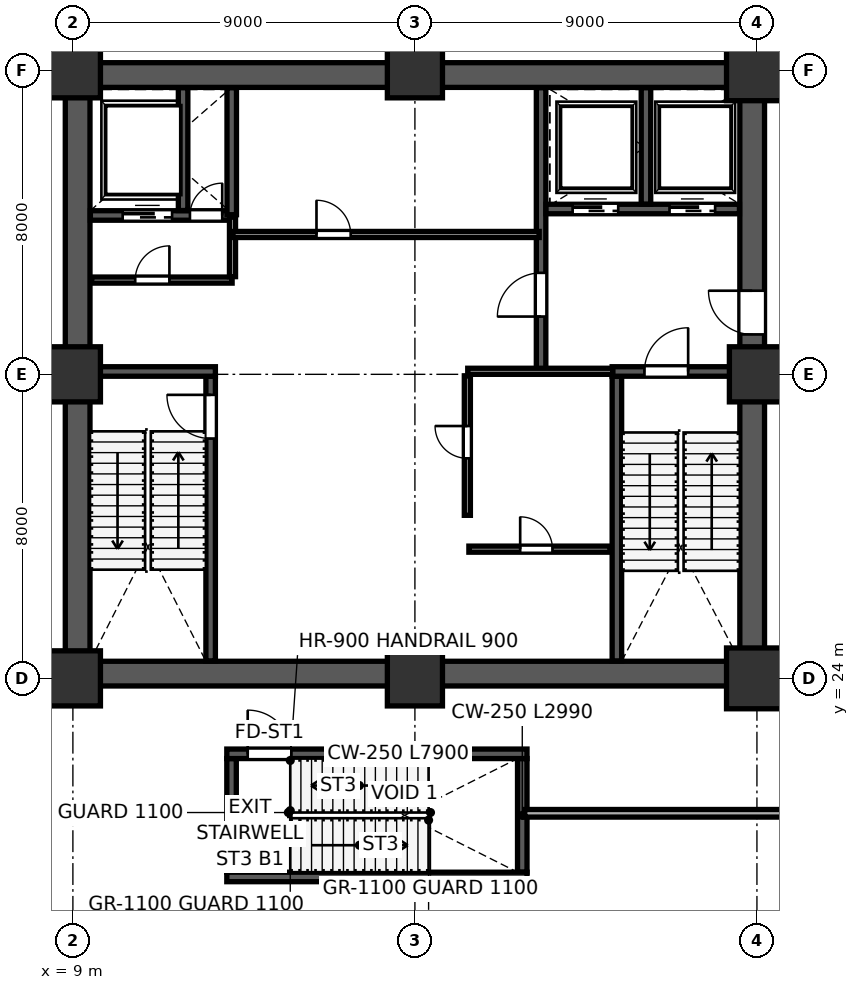
"""IFC4 building model, lengths in metres.
Left out: names, types, materials, properties, quantities, classifications, styles, units other than length and angle.
Written with IfcOpenShell. Run it as: python <this file> out.ifc"""

import sys

from ifc_helpers import new_model, si_unit, direction, frame, frame_2d, origin, origin_2d, place, context, subcontext, project, spatial, rectangle, extrude, source, transform, mapped, element, fill, save


model = new_model("IFC4")
c1 = context("Model", 3, precision=1e-05, world=origin(), true_north=direction((0.0, 1.0)))
c2 = subcontext(c1, "Body", "Model", "MODEL_VIEW")
j1 = project(units=[si_unit("LENGTHUNIT", "METRE"), si_unit("PLANEANGLEUNIT", "RADIAN")], contexts=[c1])
p1 = place(None, origin())
s1 = spatial("IfcSite", under=j1, at=p1, CompositionType="ELEMENT")
p2 = place(p1, origin())
s2 = spatial("IfcBuilding", under=s1, at=p2, CompositionType="ELEMENT")
p3 = place(p2, frame((0.0, 0.0, -4.8)))
s3 = spatial("IfcBuildingStorey", under=s2, at=p3, CompositionType="ELEMENT", Elevation=-4.8)
m1 = source(origin(), c2, "Body", "SweptSolid", [
    extrude(rectangle(XDim=1.45, YDim=1.45, at=origin_2d()), origin(), (0.0, 0.0, 1.0), 4.799),
])
for number, where, z_axis, x_axis in (
    (1, (9.0, 24.0, 0.001), (0.0, 0.0, 1.0), (1.0, 0.0, 0.0)),
    (2, (9.0, 32.0, 0.001), (0.0, 0.0, 1.0), (1.0, 0.0, 0.0)),
    (3, (9.0, 40.0, 0.001), (0.0, 0.0, 1.0), (1.0, 0.0, 0.0)),
    (4, (18.0, 24.0, 0.001), (0.0, 0.0, 1.0), (1.0, 0.0, 0.0)),
    (5, (18.0, 40.0, 0.001), (0.0, 0.0, 1.0), (1.0, 0.0, 0.0)),
):
    element("IfcColumn", number, at=place(p3, frame(where, z_axis=z_axis, x_axis=x_axis)), inside=s3, PredefinedType="COLUMN", context=c2, shape_type="MappedRepresentation", body=[
        mapped(m1, transform((0.0, 0.0, 0.0), scale=1.0)),
    ])
m2 = source(origin(), c2, "Body", "SweptSolid", [
    extrude(rectangle(XDim=1.6, YDim=1.6, at=origin_2d()), origin(), (0.0, 0.0, 1.0), 4.799),
])
p4 = place(p3, frame((27.0, 24.0, 0.001), z_axis=(0.0, 0.0, 1.0), x_axis=(1.0, 0.0, 0.0)))
e6 = element("IfcColumn", 6, at=p4, inside=s3, PredefinedType="COLUMN", context=c2, shape_type="MappedRepresentation", body=[
    mapped(m2, transform((0.0, 0.0, 0.0), scale=1.0)),
])
p5 = place(p3, frame((27.0, 32.0, 0.001), z_axis=(0.0, 0.0, 1.0), x_axis=(1.0, 0.0, 0.0)))
e7 = element("IfcColumn", 7, at=p5, inside=s3, PredefinedType="COLUMN", context=c2, shape_type="MappedRepresentation", body=[
    mapped(m1, transform((0.0, 0.0, 0.0), scale=1.0)),
])
p6 = place(p3, frame((27.0, 40.0, 0.001), z_axis=(0.0, 0.0, 1.0), x_axis=(1.0, 0.0, 0.0)))
e8 = element("IfcColumn", 8, at=p6, inside=s3, PredefinedType="COLUMN", context=c2, shape_type="MappedRepresentation", body=[
    mapped(m2, transform((0.0, 0.0, 0.0), scale=1.0)),
])
p7 = place(p3, frame((9.125, 24.45, 0.0), z_axis=(0.0, 0.0, 1.0), x_axis=(0.0, 1.0, 0.0)))
e9 = element("IfcWall", 9, at=p7, inside=s3, PredefinedType="SHEAR", context=c2, shape_type="SweptSolid", body=[
    extrude(rectangle(XDim=15.1, YDim=0.65, at=frame_2d((7.55, 0.0))), origin(), (0.0, 0.0, 1.0), 4.52),
])
p8 = place(p3, frame((26.875, 24.45, 0.0), z_axis=(0.0, 0.0, 1.0), x_axis=(0.0, 1.0, 0.0)))
e10 = element("IfcWall", 10, at=p8, inside=s3, PredefinedType="SHEAR", context=c2, shape_type="SweptSolid", body=[
    extrude(rectangle(XDim=15.1, YDim=0.65, at=frame_2d((7.55, 0.0))), origin(), (0.0, 0.0, 1.0), 4.52),
])
p9 = place(p8, frame((8.6, 0.0, 0.0)))
e11 = element("IfcOpeningElement", 11, at=p9, cuts=e10, PredefinedType="OPENING", context=c2, shape_type="SweptSolid", body=[
    extrude(rectangle(XDim=1.15, YDim=2.2, at=frame_2d((0.575, 1.1))), frame((0.0, 0.335, 0.0), z_axis=(0.0, -1.0, 0.0), x_axis=(1.0, 0.0, 0.0)), (0.0, 0.0, 1.0), 0.67),
])
for number, where, z_axis, x_axis in (
    (12, (8.8, 24.125, 0.0), (0.0, 0.0, 1.0), (1.0, 0.0, 0.0)),
    (13, (8.8, 39.875, 0.0), (0.0, 0.0, 1.0), (1.0, 0.0, 0.0)),
):
    element("IfcWall", number, at=place(p3, frame(where, z_axis=z_axis, x_axis=x_axis)), inside=s3, PredefinedType="SHEAR", context=c2, shape_type="SweptSolid", body=[
        extrude(rectangle(XDim=18.4, YDim=0.65, at=frame_2d((9.2, 0.0))), origin(), (0.0, 0.0, 1.0), 4.52),
    ])
p10 = place(p3, frame((12.625, 24.46, 0.0), z_axis=(0.0, 0.0, 1.0), x_axis=(0.0, 1.0, 0.0)))
e14 = element("IfcWall", 14, at=p10, inside=s3, PredefinedType="SHEAR", context=c2, shape_type="SweptSolid", body=[
    extrude(rectangle(XDim=7.49, YDim=0.25, at=frame_2d((3.745, 0.0))), origin(), (0.0, 0.0, 1.0), 4.52),
])
p11 = place(p10, frame((5.85, 0.0, 0.0)))
e15 = element("IfcOpeningElement", 15, at=p11, cuts=e14, PredefinedType="OPENING", context=c2, shape_type="SweptSolid", body=[
    extrude(rectangle(XDim=1.15, YDim=2.2, at=frame_2d((0.575, 1.1))), frame((0.0, 0.135, 0.0), z_axis=(0.0, -1.0, 0.0), x_axis=(1.0, 0.0, 0.0)), (0.0, 0.0, 1.0), 0.27),
])
p12 = place(p3, frame((9.46, 32.075, 0.0), z_axis=(0.0, 0.0, 1.0), x_axis=(1.0, 0.0, 0.0)))
e16 = element("IfcWall", 16, at=p12, inside=s3, PredefinedType="SHEAR", context=c2, shape_type="SweptSolid", body=[
    extrude(rectangle(XDim=3.29, YDim=0.25, at=frame_2d((1.645, 0.0))), origin(), (0.0, 0.0, 1.0), 4.52),
])
p13 = place(p3, frame((23.315, 24.46, 0.0), z_axis=(0.0, 0.0, 1.0), x_axis=(0.0, 1.0, 0.0)))
e17 = element("IfcWall", 17, at=p13, inside=s3, PredefinedType="SHEAR", context=c2, shape_type="SweptSolid", body=[
    extrude(rectangle(XDim=7.49, YDim=0.25, at=frame_2d((3.745, 0.0))), origin(), (0.0, 0.0, 1.0), 4.52),
])
p14 = place(p3, frame((23.19, 32.075, 0.0), z_axis=(0.0, 0.0, 1.0), x_axis=(1.0, 0.0, 0.0)))
e18 = element("IfcWall", 18, at=p14, inside=s3, PredefinedType="SHEAR", context=c2, shape_type="SweptSolid", body=[
    extrude(rectangle(XDim=3.35, YDim=0.25, at=frame_2d((1.675, 0.0))), origin(), (0.0, 0.0, 1.0), 4.52),
])
p15 = place(p14, frame((0.85, 0.0, 0.0)))
e19 = element("IfcOpeningElement", 19, at=p15, cuts=e18, PredefinedType="OPENING", context=c2, shape_type="SweptSolid", body=[
    extrude(rectangle(XDim=1.15, YDim=2.2, at=frame_2d((0.575, 1.1))), frame((0.0, 0.135, 0.0), z_axis=(0.0, -1.0, 0.0), x_axis=(1.0, 0.0, 0.0)), (0.0, 0.0, 1.0), 0.27),
])
p16 = place(p3, frame((21.32, 32.12, 0.0), z_axis=(0.0, 0.0, 1.0), x_axis=(0.0, 1.0, 0.0)))
e20 = element("IfcWall", 20, at=p16, inside=s3, PredefinedType="SHEAR", context=c2, shape_type="SweptSolid", body=[
    extrude(rectangle(XDim=7.42, YDim=0.25, at=frame_2d((3.71, 0.0))), origin(), (0.0, 0.0, 1.0), 4.52),
])
p17 = place(p16, frame((1.4, 0.0, 0.0)))
e21 = element("IfcOpeningElement", 21, at=p17, cuts=e20, PredefinedType="OPENING", context=c2, shape_type="SweptSolid", body=[
    extrude(rectangle(XDim=1.15, YDim=2.2, at=frame_2d((0.575, 1.1))), frame((0.0, 0.135, 0.0), z_axis=(0.0, -1.0, 0.0), x_axis=(1.0, 0.0, 0.0)), (0.0, 0.0, 1.0), 0.27),
])
p18 = place(p3, frame((9.46, 36.18, 0.0), z_axis=(0.0, 0.0, 1.0), x_axis=(1.0, 0.0, 0.0)))
e22 = element("IfcWall", 22, at=p18, inside=s3, PredefinedType="SHEAR", context=c2, shape_type="SweptSolid", body=[
    extrude(rectangle(XDim=3.79, YDim=0.25, at=frame_2d((1.895, 0.0))), origin(), (0.0, 0.0, 1.0), 4.52),
])
p19 = place(p18, frame((2.62, 0.0, 0.0)))
e23 = element("IfcOpeningElement", 23, at=p19, cuts=e22, PredefinedType="OPENING", context=c2, shape_type="SweptSolid", body=[
    extrude(rectangle(XDim=0.85, YDim=2.1, at=frame_2d((0.425, 1.05))), frame((0.0, 0.135, 0.0), z_axis=(0.0, -1.0, 0.0), x_axis=(1.0, 0.0, 0.0)), (0.0, 0.0, 1.0), 0.27),
])
p20 = place(p18, frame((0.85, 0.0, 0.0)))
e24 = element("IfcOpeningElement", 24, at=p20, cuts=e22, PredefinedType="OPENING", context=c2, shape_type="SweptSolid", body=[
    extrude(rectangle(XDim=1.3, YDim=2.25, at=frame_2d((0.65, 1.125))), frame((0.0, 0.135, 0.0), z_axis=(0.0, -1.0, 0.0), x_axis=(1.0, 0.0, 0.0)), (0.0, 0.0, 1.0), 0.27),
])
p21 = place(p3, frame((11.9, 36.31, 0.0), z_axis=(0.0, 0.0, 1.0), x_axis=(0.0, 1.0, 0.0)))
e25 = element("IfcWall", 25, at=p21, inside=s3, PredefinedType="SHEAR", context=c2, shape_type="SweptSolid", body=[
    extrude(rectangle(XDim=3.23, YDim=0.25, at=frame_2d((1.615, 0.0))), origin(), (0.0, 0.0, 1.0), 4.52),
])
p22 = place(p3, frame((21.45, 36.35, 0.0), z_axis=(0.0, 0.0, 1.0), x_axis=(1.0, 0.0, 0.0)))
e26 = element("IfcWall", 26, at=p22, inside=s3, PredefinedType="SHEAR", context=c2, shape_type="SweptSolid", body=[
    extrude(rectangle(XDim=5.09, YDim=0.25, at=frame_2d((2.545, 0.0))), origin(), (0.0, 0.0, 1.0), 4.52),
])
p23 = place(p22, frame((0.7, 0.0, 0.0)))
e27 = element("IfcOpeningElement", 27, at=p23, cuts=e26, PredefinedType="OPENING", context=c2, shape_type="SweptSolid", body=[
    extrude(rectangle(XDim=1.2, YDim=2.2, at=frame_2d((0.6, 1.1))), frame((0.0, 0.135, 0.0), z_axis=(0.0, -1.0, 0.0), x_axis=(1.0, 0.0, 0.0)), (0.0, 0.0, 1.0), 0.27),
])
p24 = place(p22, frame((3.25, 0.0, 0.0)))
e28 = element("IfcOpeningElement", 28, at=p24, cuts=e26, PredefinedType="OPENING", context=c2, shape_type="SweptSolid", body=[
    extrude(rectangle(XDim=1.2, YDim=2.2, at=frame_2d((0.6, 1.1))), frame((0.0, 0.135, 0.0), z_axis=(0.0, -1.0, 0.0), x_axis=(1.0, 0.0, 0.0)), (0.0, 0.0, 1.0), 0.27),
])
p25 = place(p3, frame((24.08, 36.48, 0.0), z_axis=(0.0, 0.0, 1.0), x_axis=(0.0, 1.0, 0.0)))
e29 = element("IfcWall", 29, at=p25, inside=s3, PredefinedType="SHEAR", context=c2, shape_type="SweptSolid", body=[
    extrude(rectangle(XDim=3.06, YDim=0.25, at=frame_2d((1.53, 0.0))), origin(), (0.0, 0.0, 1.0), 4.52),
])
p26 = place(p3, frame((13.18, 36.2, 0.0), z_axis=(0.0, 0.0, 1.0), x_axis=(0.0, 1.0, 0.0)))
e30 = element("IfcWall", 30, at=p26, inside=s3, PredefinedType="SHEAR", context=c2, shape_type="SweptSolid", body=[
    extrude(rectangle(XDim=3.34, YDim=0.25, at=frame_2d((1.67, 0.0))), origin(), (0.0, 0.0, 1.0), 4.52),
])
for number, where, z_axis, x_axis in (
    (31, (13.175, 18.9, 0.0), (0.0, 0.0, 1.0), (0.0, 1.0, 0.0)),
    (32, (20.825, 18.9, 0.0), (0.0, 0.0, 1.0), (0.0, 1.0, 0.0)),
):
    element("IfcWall", number, at=place(p3, frame(where, z_axis=z_axis, x_axis=x_axis)), inside=s3, PredefinedType="SHEAR", context=c2, shape_type="SweptSolid", body=[
        extrude(rectangle(XDim=2.99, YDim=0.25, at=frame_2d((1.495, 0.0))), origin(), (0.0, 0.0, 1.0), 4.52),
    ])
p27 = place(p3, frame((13.05, 18.775, 0.0), z_axis=(0.0, 0.0, 1.0), x_axis=(1.0, 0.0, 0.0)))
e33 = element("IfcWall", 33, at=p27, inside=s3, PredefinedType="SHEAR", context=c2, shape_type="SweptSolid", body=[
    extrude(rectangle(XDim=7.9, YDim=0.25, at=frame_2d((3.95, 0.0))), origin(), (0.0, 0.0, 1.0), 4.52),
])
p28 = place(p3, frame((13.05, 22.015, 0.0), z_axis=(0.0, 0.0, 1.0), x_axis=(1.0, 0.0, 0.0)))
e34 = element("IfcWall", 34, at=p28, inside=s3, PredefinedType="SHEAR", context=c2, shape_type="SweptSolid", body=[
    extrude(rectangle(XDim=7.9, YDim=0.25, at=frame_2d((3.95, 0.0))), origin(), (0.0, 0.0, 1.0), 4.52),
])
p29 = place(p28, frame((0.55, 0.0, 0.0)))
e35 = element("IfcOpeningElement", 35, at=p29, cuts=e34, PredefinedType="OPENING", context=c2, shape_type="SweptSolid", body=[
    extrude(rectangle(XDim=1.15, YDim=2.2, at=frame_2d((0.575, 1.1))), frame((0.0, 0.135, 0.0), z_axis=(0.0, -1.0, 0.0), x_axis=(1.0, 0.0, 0.0)), (0.0, 0.0, 1.0), 0.27),
])
p30 = place(p3, frame((9.49, 34.48, 0.0), z_axis=(0.0, 0.0, 1.0), x_axis=(1.0, 0.0, 0.0)))
e36 = element("IfcWall", 36, at=p30, inside=s3, PredefinedType="PARTITIONING", context=c2, shape_type="SweptSolid", body=[
    extrude(rectangle(XDim=3.7, YDim=0.16, at=frame_2d((1.85, 0.0))), origin(), (0.0, 0.0, 1.0), 4.52),
])
p31 = place(p30, frame((1.15, 0.0, 0.0)))
e37 = element("IfcOpeningElement", 37, at=p31, cuts=e36, PredefinedType="OPENING", context=c2, shape_type="SweptSolid", body=[
    extrude(rectangle(XDim=0.9, YDim=2.15, at=frame_2d((0.45, 1.075))), frame((0.0, 0.09, 0.0), z_axis=(0.0, -1.0, 0.0), x_axis=(1.0, 0.0, 0.0)), (0.0, 0.0, 1.0), 0.18),
])
p32 = place(p3, frame((13.2, 34.57, 0.0), z_axis=(0.0, 0.0, 1.0), x_axis=(0.0, 1.0, 0.0)))
e38 = element("IfcWall", 38, at=p32, inside=s3, PredefinedType="PARTITIONING", context=c2, shape_type="SweptSolid", body=[
    extrude(rectangle(XDim=1.57, YDim=0.16, at=frame_2d((0.785, 0.0))), origin(), (0.0, 0.0, 1.0), 4.52),
])
p33 = place(p3, frame((13.21, 35.68, 0.0), z_axis=(0.0, 0.0, 1.0), x_axis=(1.0, 0.0, 0.0)))
e39 = element("IfcWall", 39, at=p33, inside=s3, PredefinedType="PARTITIONING", context=c2, shape_type="SweptSolid", body=[
    extrude(rectangle(XDim=8.06, YDim=0.16, at=frame_2d((4.03, 0.0))), origin(), (0.0, 0.0, 1.0), 4.52),
])
p34 = place(p33, frame((2.2, 0.0, 0.0)))
e40 = element("IfcOpeningElement", 40, at=p34, cuts=e39, PredefinedType="OPENING", context=c2, shape_type="SweptSolid", body=[
    extrude(rectangle(XDim=0.9, YDim=2.15, at=frame_2d((0.45, 1.075))), frame((0.0, 0.09, 0.0), z_axis=(0.0, -1.0, 0.0), x_axis=(1.0, 0.0, 0.0)), (0.0, 0.0, 1.0), 0.18),
])
p35 = place(p3, frame((19.39, 32.08, 0.0), z_axis=(0.0, 0.0, 1.0), x_axis=(1.0, 0.0, 0.0)))
e41 = element("IfcWall", 41, at=p35, inside=s3, PredefinedType="PARTITIONING", context=c2, shape_type="SweptSolid", body=[
    extrude(rectangle(XDim=3.82, YDim=0.16, at=frame_2d((1.91, 0.0))), origin(), (0.0, 0.0, 1.0), 4.52),
])
p36 = place(p3, frame((19.38, 28.29, 0.0), z_axis=(0.0, 0.0, 1.0), x_axis=(0.0, 1.0, 0.0)))
e42 = element("IfcWall", 42, at=p36, inside=s3, PredefinedType="PARTITIONING", context=c2, shape_type="SweptSolid", body=[
    extrude(rectangle(XDim=3.67, YDim=0.16, at=frame_2d((1.835, 0.0))), origin(), (0.0, 0.0, 1.0), 4.52),
])
p37 = place(p36, frame((1.5, 0.0, 0.0)))
e43 = element("IfcOpeningElement", 43, at=p37, cuts=e42, PredefinedType="OPENING", context=c2, shape_type="SweptSolid", body=[
    extrude(rectangle(XDim=0.85, YDim=2.1, at=frame_2d((0.425, 1.05))), frame((0.0, 0.09, 0.0), z_axis=(0.0, -1.0, 0.0), x_axis=(1.0, 0.0, 0.0)), (0.0, 0.0, 1.0), 0.18),
])
p38 = place(p3, frame((19.42, 27.4, 0.0), z_axis=(0.0, 0.0, 1.0), x_axis=(1.0, 0.0, 0.0)))
e44 = element("IfcWall", 44, at=p38, inside=s3, PredefinedType="PARTITIONING", context=c2, shape_type="SweptSolid", body=[
    extrude(rectangle(XDim=3.72, YDim=0.16, at=frame_2d((1.86, 0.0))), origin(), (0.0, 0.0, 1.0), 4.52),
])
p39 = place(p38, frame((1.35, 0.0, 0.0)))
e45 = element("IfcOpeningElement", 45, at=p39, cuts=e44, PredefinedType="OPENING", context=c2, shape_type="SweptSolid", body=[
    extrude(rectangle(XDim=0.85, YDim=2.1, at=frame_2d((0.425, 1.05))), frame((0.0, 0.09, 0.0), z_axis=(0.0, -1.0, 0.0), x_axis=(1.0, 0.0, 0.0)), (0.0, 0.0, 1.0), 0.18),
])
p40 = place(p3, frame((20.89, 20.45, 0.0), z_axis=(0.0, 0.0, 1.0), x_axis=(1.0, 0.0, 0.0)))
e46 = element("IfcWall", 46, at=p40, inside=s3, PredefinedType="SOLIDWALL", context=c2, shape_type="SweptSolid", body=[
    extrude(rectangle(XDim=26.97, YDim=0.2, at=frame_2d((13.485, 0.0))), origin(), (0.0, 0.0, 1.0), 3.65),
])
p41 = place(p40, frame((9.6, 0.0, 0.0)))
e47 = element("IfcOpeningElement", 47, at=p41, cuts=e46, PredefinedType="OPENING", context=c2, shape_type="SweptSolid", body=[
    extrude(rectangle(XDim=1.1, YDim=2.2, at=frame_2d((0.55, 1.1))), frame((0.0, 0.11, 0.0), z_axis=(0.0, -1.0, 0.0), x_axis=(1.0, 0.0, 0.0)), (0.0, 0.0, 1.0), 0.22),
])
p42 = place(p3, frame((27.24, 32.5, 0.0), z_axis=(0.0, 0.0, 1.0), x_axis=(1.0, 0.0, 0.0)))
e48 = element("IfcWall", 48, at=p42, inside=s3, PredefinedType="SOLIDWALL", context=c2, shape_type="SweptSolid", body=[
    extrude(rectangle(XDim=62.22, YDim=0.2, at=frame_2d((31.11, 0.0))), origin(), (0.0, 0.0, 1.0), 3.655),
])
m3 = source(origin(), c2, "Body", "SweptSolid", [
    extrude(rectangle(XDim=1.15, YDim=2.2, at=frame_2d((0.575, 1.1))), frame((0.0, 0.025, 0.0), z_axis=(0.0, -1.0, 0.0), x_axis=(1.0, 0.0, 0.0)), (0.0, 0.0, 1.0), 0.05),
])
p43 = place(p11, origin())
e49 = element("IfcDoor", 49, at=p43, inside=s3, OperationType="SINGLE_SWING_RIGHT", PredefinedType="DOOR", context=c2, shape_type="MappedRepresentation", body=[
    mapped(m3, transform((0.0, 0.0, 0.0), scale=1.0)),
])
fill(e15, e49)
m4 = source(origin(), c2, "Body", "SweptSolid", [
    extrude(rectangle(XDim=1.15, YDim=2.2, at=frame_2d((0.575, 1.1))), frame((0.0, 0.025, 0.0), z_axis=(0.0, -1.0, 0.0), x_axis=(1.0, 0.0, 0.0)), (0.0, 0.0, 1.0), 0.05),
])
p44 = place(p17, origin())
e50 = element("IfcDoor", 50, at=p44, inside=s3, OperationType="SINGLE_SWING_LEFT", PredefinedType="DOOR", context=c2, shape_type="MappedRepresentation", body=[
    mapped(m4, transform((0.0, 0.0, 0.0), scale=1.0)),
])
fill(e21, e50)
p45 = place(p15, origin())
e51 = element("IfcDoor", 51, at=p45, inside=s3, OperationType="SINGLE_SWING_RIGHT", PredefinedType="DOOR", context=c2, shape_type="MappedRepresentation", body=[
    mapped(m3, transform((0.0, 0.0, 0.0), scale=1.0)),
])
fill(e19, e51)
p46 = place(p9, origin())
e52 = element("IfcDoor", 52, at=p46, inside=s3, OperationType="SINGLE_SWING_RIGHT", PredefinedType="DOOR", context=c2, shape_type="MappedRepresentation", body=[
    mapped(m4, transform((0.0, 0.0, 0.0), scale=1.0)),
])
fill(e11, e52)
p47 = place(p29, origin())
e53 = element("IfcDoor", 53, at=p47, inside=s3, OperationType="SINGLE_SWING_LEFT", PredefinedType="DOOR", context=c2, shape_type="MappedRepresentation", body=[
    mapped(m3, transform((0.0, 0.0, 0.0), scale=1.0)),
])
fill(e35, e53)
m5 = source(origin(), c2, "Body", "SweptSolid", [
    extrude(rectangle(XDim=0.85, YDim=2.1, at=frame_2d((0.425, 1.05))), frame((0.0, 0.025, 0.0), z_axis=(0.0, -1.0, 0.0), x_axis=(1.0, 0.0, 0.0)), (0.0, 0.0, 1.0), 0.05),
])
p48 = place(p19, origin())
e54 = element("IfcDoor", 54, at=p48, inside=s3, OperationType="SINGLE_SWING_RIGHT", PredefinedType="DOOR", context=c2, shape_type="MappedRepresentation", body=[
    mapped(m5, transform((0.0, 0.0, 0.0), scale=1.0)),
])
fill(e23, e54)
m6 = source(origin(), c2, "Body", "SweptSolid", [
    extrude(rectangle(XDim=1.2, YDim=2.2, at=frame_2d((0.6, 1.1))), frame((0.0, 0.025, 0.0), z_axis=(0.0, -1.0, 0.0), x_axis=(1.0, 0.0, 0.0)), (0.0, 0.0, 1.0), 0.05),
])
p49 = place(p23, origin())
e55 = element("IfcDoor", 55, at=p49, inside=s3, OperationType="SLIDING_TO_LEFT", PredefinedType="DOOR", context=c2, shape_type="MappedRepresentation", body=[
    mapped(m6, transform((0.0, 0.0, 0.0), scale=1.0)),
])
fill(e27, e55)
p50 = place(p24, origin())
e56 = element("IfcDoor", 56, at=p50, inside=s3, OperationType="SLIDING_TO_RIGHT", PredefinedType="DOOR", context=c2, shape_type="MappedRepresentation", body=[
    mapped(m6, transform((0.0, 0.0, 0.0), scale=1.0)),
])
fill(e28, e56)
m7 = source(origin(), c2, "Body", "SweptSolid", [
    extrude(rectangle(XDim=1.3, YDim=2.25, at=frame_2d((0.65, 1.125))), frame((0.0, 0.025, 0.0), z_axis=(0.0, -1.0, 0.0), x_axis=(1.0, 0.0, 0.0)), (0.0, 0.0, 1.0), 0.05),
])
p51 = place(p20, origin())
e57 = element("IfcDoor", 57, at=p51, inside=s3, OperationType="SLIDING_TO_LEFT", PredefinedType="DOOR", context=c2, shape_type="MappedRepresentation", body=[
    mapped(m7, transform((0.0, 0.0, 0.0), scale=1.0)),
])
fill(e24, e57)
m8 = source(origin(), c2, "Body", "SweptSolid", [
    extrude(rectangle(XDim=0.9, YDim=2.15, at=frame_2d((0.45, 1.075))), frame((0.0, 0.025, 0.0), z_axis=(0.0, -1.0, 0.0), x_axis=(1.0, 0.0, 0.0)), (0.0, 0.0, 1.0), 0.05),
])
p52 = place(p31, origin())
e58 = element("IfcDoor", 58, at=p52, inside=s3, OperationType="SINGLE_SWING_RIGHT", PredefinedType="DOOR", context=c2, shape_type="MappedRepresentation", body=[
    mapped(m8, transform((0.0, 0.0, 0.0), scale=1.0)),
])
fill(e37, e58)
p53 = place(p34, origin())
e59 = element("IfcDoor", 59, at=p53, inside=s3, OperationType="SINGLE_SWING_LEFT", PredefinedType="DOOR", context=c2, shape_type="MappedRepresentation", body=[
    mapped(m8, transform((0.0, 0.0, 0.0), scale=1.0)),
])
fill(e40, e59)
p54 = place(p39, origin())
e60 = element("IfcDoor", 60, at=p54, inside=s3, OperationType="SINGLE_SWING_LEFT", PredefinedType="DOOR", context=c2, shape_type="MappedRepresentation", body=[
    mapped(m5, transform((0.0, 0.0, 0.0), scale=1.0)),
])
fill(e45, e60)
p55 = place(p37, origin())
e61 = element("IfcDoor", 61, at=p55, inside=s3, OperationType="SINGLE_SWING_RIGHT", PredefinedType="DOOR", context=c2, shape_type="MappedRepresentation", body=[
    mapped(m5, transform((0.0, 0.0, 0.0), scale=1.0)),
])
fill(e43, e61)
save(model, sys.argv[1])
